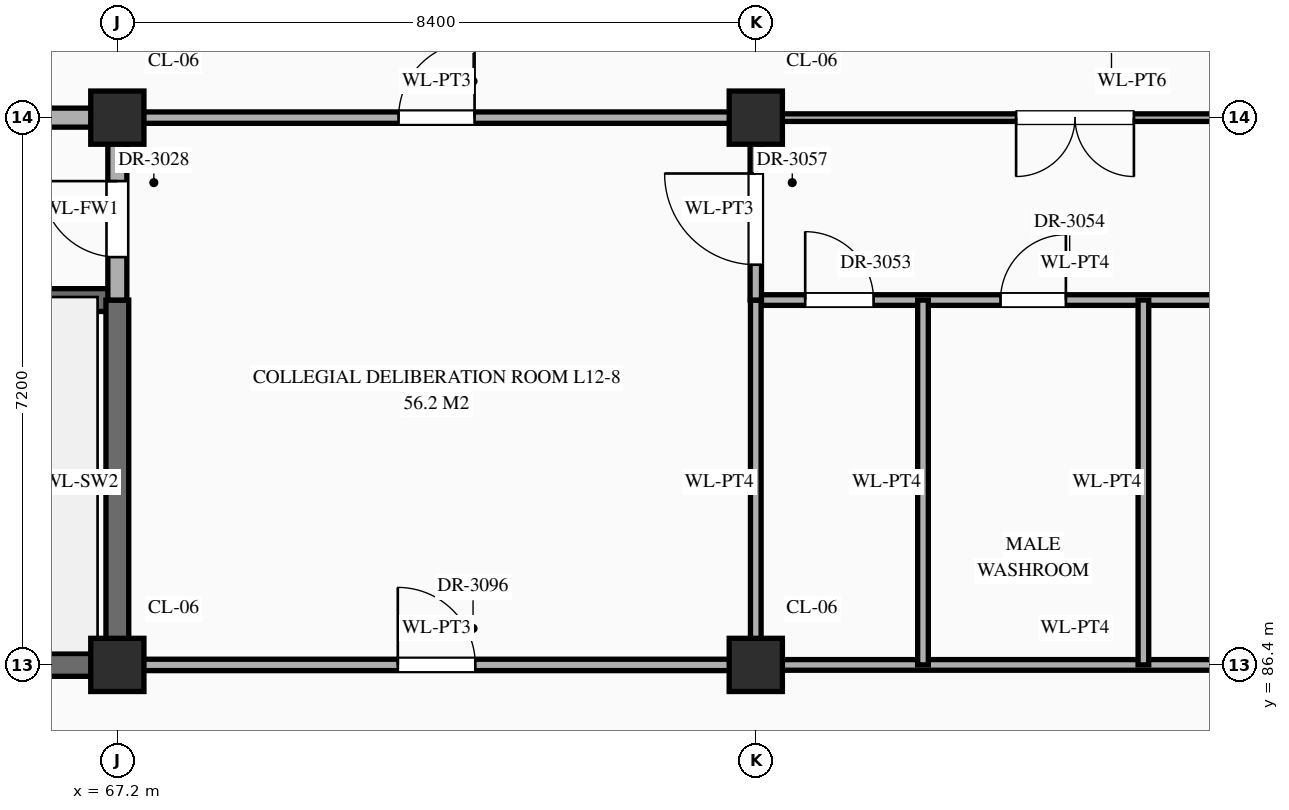
"""IFC4 building model, lengths in metres.
Left out: names, types, materials, properties, quantities, classifications, styles, units other than length and angle.
Written with IfcOpenShell. Run it as: python <this file> out.ifc"""

import sys

from ifc_helpers import new_model, si_unit, direction, frame, frame_2d, origin, origin_2d, place, context, subcontext, project, spatial, rectangle, extrude, element, fill, save


model = new_model("IFC4")
c1 = context("Model", 3, precision=1e-05, world=origin(), true_north=direction((0.0, 1.0)))
c2 = subcontext(c1, "Body", "Model", "MODEL_VIEW")
j1 = project(units=[si_unit("LENGTHUNIT", "METRE"), si_unit("PLANEANGLEUNIT", "RADIAN")], contexts=[c1])
p1 = place(None, origin())
s1 = spatial("IfcSite", under=j1, at=p1, CompositionType="ELEMENT")
p2 = place(p1, origin())
s2 = spatial("IfcBuilding", under=s1, at=p2, CompositionType="ELEMENT")
p3 = place(p2, frame((0.0, 0.0, 51.9)))
s3 = spatial("IfcBuildingStorey", under=s2, at=p3, CompositionType="ELEMENT", Elevation=51.9)
for number, where, z_axis, x_axis in (
    (1, (67.2, 86.4, 0.0), (0.0, 0.0, 1.0), (1.0, 0.0, 0.0)),
    (2, (67.2, 93.6, 0.0), (0.0, 0.0, 1.0), (1.0, 0.0, 0.0)),
    (3, (75.6, 86.4, 0.0), (0.0, 0.0, 1.0), (1.0, 0.0, 0.0)),
    (4, (75.6, 93.6, 0.0), (0.0, 0.0, 1.0), (1.0, 0.0, 0.0)),
):
    element("IfcColumn", number, at=place(p3, frame(where, z_axis=z_axis, x_axis=x_axis)), inside=s3, PredefinedType="COLUMN", context=c2, shape_type="SweptSolid", body=[
        extrude(rectangle(XDim=0.7, YDim=0.7, at=origin_2d()), origin(), (0.0, 0.0, 1.0), 4.2),
    ])
p4 = place(p3, frame((58.8, 86.4, 0.0), z_axis=(0.0, 0.0, 1.0), x_axis=(1.0, 0.0, 0.0)))
e5 = element("IfcWall", 5, at=p4, inside=s3, PredefinedType="SHEAR", context=c2, shape_type="SweptSolid", body=[
    extrude(rectangle(XDim=8.4, YDim=0.3, at=frame_2d((4.2, 0.0))), origin(), (0.0, 0.0, 1.0), 3.96),
])
p5 = place(p3, frame((67.2, 86.4, 0.0), z_axis=(0.0, 0.0, 1.0), x_axis=(1.0, 0.0, 0.0)))
e6 = element("IfcWall", 6, at=p5, inside=s3, PredefinedType="STANDARD", context=c2, shape_type="SweptSolid", body=[
    extrude(rectangle(XDim=8.4, YDim=0.15, at=frame_2d((4.2, 0.0))), origin(), (0.0, 0.0, 1.0), 3.11),
])
p6 = place(p5, frame((3.69, 0.0, 0.0)))
e7 = element("IfcOpeningElement", 7, at=p6, cuts=e6, PredefinedType="OPENING", context=c2, shape_type="SweptSolid", body=[
    extrude(rectangle(XDim=1.02, YDim=2.4, at=frame_2d((0.51, 1.2))), frame((0.0, 0.087, 0.0), z_axis=(0.0, -1.0, 0.0), x_axis=(1.0, 0.0, 0.0)), (0.0, 0.0, 1.0), 0.174),
])
p7 = place(p3, frame((75.6, 86.4, 0.0), z_axis=(0.0, 0.0, 1.0), x_axis=(1.0, 0.0, 0.0)))
e8 = element("IfcWall", 8, at=p7, inside=s3, PredefinedType="STANDARD", context=c2, shape_type="SweptSolid", body=[
    extrude(rectangle(XDim=8.4, YDim=0.14, at=frame_2d((4.2, 0.0))), origin(), (0.0, 0.0, 1.0), 3.11),
])
p8 = place(p3, frame((58.8, 91.2, 0.0), z_axis=(0.0, 0.0, 1.0), x_axis=(1.0, 0.0, 0.0)))
e9 = element("IfcWall", 9, at=p8, inside=s3, PredefinedType="SHEAR", context=c2, shape_type="SweptSolid", body=[
    extrude(rectangle(XDim=8.4, YDim=0.3, at=frame_2d((4.2, 0.0))), origin(), (0.0, 0.0, 1.0), 3.96),
])
p9 = place(p8, frame((0.65, 0.0, 0.0)))
e10 = element("IfcOpeningElement", 10, at=p9, cuts=e9, PredefinedType="OPENING", context=c2, shape_type="SweptSolid", body=[
    extrude(rectangle(XDim=1.1, YDim=2.2, at=frame_2d((0.55, 1.1))), frame((0.0, 0.162, 0.0), z_axis=(0.0, -1.0, 0.0), x_axis=(1.0, 0.0, 0.0)), (0.0, 0.0, 1.0), 0.324),
])
p10 = place(p3, frame((75.6, 91.2, 0.0), z_axis=(0.0, 0.0, 1.0), x_axis=(1.0, 0.0, 0.0)))
e11 = element("IfcWall", 11, at=p10, inside=s3, PredefinedType="STANDARD", context=c2, shape_type="SweptSolid", body=[
    extrude(rectangle(XDim=8.4, YDim=0.14, at=frame_2d((4.2, 0.0))), origin(), (0.0, 0.0, 1.0), 3.96),
])
p11 = place(p10, frame((0.65, 0.0, 0.0)))
e12 = element("IfcOpeningElement", 12, at=p11, cuts=e11, PredefinedType="OPENING", context=c2, shape_type="SweptSolid", body=[
    extrude(rectangle(XDim=0.9, YDim=2.15, at=frame_2d((0.45, 1.075))), frame((0.0, 0.082, 0.0), z_axis=(0.0, -1.0, 0.0), x_axis=(1.0, 0.0, 0.0)), (0.0, 0.0, 1.0), 0.164),
])
p12 = place(p10, frame((3.22, 0.0, 0.0)))
e13 = element("IfcOpeningElement", 13, at=p12, cuts=e11, PredefinedType="OPENING", context=c2, shape_type="SweptSolid", body=[
    extrude(rectangle(XDim=0.86, YDim=2.1, at=frame_2d((0.43, 1.05))), frame((0.0, 0.082, 0.0), z_axis=(0.0, -1.0, 0.0), x_axis=(1.0, 0.0, 0.0)), (0.0, 0.0, 1.0), 0.164),
])
p13 = place(p10, frame((6.32, 0.0, 0.0)))
e14 = element("IfcOpeningElement", 14, at=p13, cuts=e11, PredefinedType="OPENING", context=c2, shape_type="SweptSolid", body=[
    extrude(rectangle(XDim=0.86, YDim=2.1, at=frame_2d((0.43, 1.05))), frame((0.0, 0.082, 0.0), z_axis=(0.0, -1.0, 0.0), x_axis=(1.0, 0.0, 0.0)), (0.0, 0.0, 1.0), 0.164),
])
p14 = place(p3, frame((58.8, 93.6, 0.0), z_axis=(0.0, 0.0, 1.0), x_axis=(1.0, 0.0, 0.0)))
e15 = element("IfcWall", 15, at=p14, inside=s3, PredefinedType="STANDARD", context=c2, shape_type="SweptSolid", body=[
    extrude(rectangle(XDim=8.4, YDim=0.25, at=frame_2d((4.2, 0.0))), origin(), (0.0, 0.0, 1.0), 3.11),
])
p15 = place(p14, frame((3.45, 0.0, 0.0)))
e16 = element("IfcOpeningElement", 16, at=p15, cuts=e15, PredefinedType="OPENING", context=c2, shape_type="SweptSolid", body=[
    extrude(rectangle(XDim=1.5, YDim=2.25, at=frame_2d((0.75, 1.125))), frame((0.0, 0.137, 0.0), z_axis=(0.0, -1.0, 0.0), x_axis=(1.0, 0.0, 0.0)), (0.0, 0.0, 1.0), 0.274),
])
p16 = place(p3, frame((67.2, 93.6, 0.0), z_axis=(0.0, 0.0, 1.0), x_axis=(1.0, 0.0, 0.0)))
e17 = element("IfcWall", 17, at=p16, inside=s3, PredefinedType="STANDARD", context=c2, shape_type="SweptSolid", body=[
    extrude(rectangle(XDim=8.4, YDim=0.15, at=frame_2d((4.2, 0.0))), origin(), (0.0, 0.0, 1.0), 3.11),
])
p17 = place(p16, frame((3.7, 0.0, 0.0)))
e18 = element("IfcOpeningElement", 18, at=p17, cuts=e17, PredefinedType="OPENING", context=c2, shape_type="SweptSolid", body=[
    extrude(rectangle(XDim=1.0, YDim=2.25, at=frame_2d((0.5, 1.125))), frame((0.0, 0.087, 0.0), z_axis=(0.0, -1.0, 0.0), x_axis=(1.0, 0.0, 0.0)), (0.0, 0.0, 1.0), 0.174),
])
p18 = place(p3, frame((75.6, 93.6, 0.0), z_axis=(0.0, 0.0, 1.0), x_axis=(1.0, 0.0, 0.0)))
e19 = element("IfcWall", 19, at=p18, inside=s3, PredefinedType="STANDARD", context=c2, shape_type="SweptSolid", body=[
    extrude(rectangle(XDim=14.0, YDim=0.1, at=frame_2d((7.0, 0.0))), origin(), (0.0, 0.0, 1.0), 3.11),
])
p19 = place(p18, frame((3.425, 0.0, 0.0)))
e20 = element("IfcOpeningElement", 20, at=p19, cuts=e19, PredefinedType="OPENING", context=c2, shape_type="SweptSolid", body=[
    extrude(rectangle(XDim=1.55, YDim=2.35, at=frame_2d((0.775, 1.175))), frame((0.0, 0.062, 0.0), z_axis=(0.0, -1.0, 0.0), x_axis=(1.0, 0.0, 0.0)), (0.0, 0.0, 1.0), 0.124),
])
p20 = place(p18, frame((9.445, 0.0, 0.0)))
e21 = element("IfcOpeningElement", 21, at=p20, cuts=e19, PredefinedType="OPENING", context=c2, shape_type="SweptSolid", body=[
    extrude(rectangle(XDim=0.98, YDim=2.35, at=frame_2d((0.49, 1.175))), frame((0.0, 0.062, 0.0), z_axis=(0.0, -1.0, 0.0), x_axis=(1.0, 0.0, 0.0)), (0.0, 0.0, 1.0), 0.124),
])
p21 = place(p18, frame((12.09, 0.0, 0.0)))
e22 = element("IfcOpeningElement", 22, at=p21, cuts=e19, PredefinedType="OPENING", context=c2, shape_type="SweptSolid", body=[
    extrude(rectangle(XDim=1.02, YDim=2.4, at=frame_2d((0.51, 1.2))), frame((0.0, 0.062, 0.0), z_axis=(0.0, -1.0, 0.0), x_axis=(1.0, 0.0, 0.0)), (0.0, 0.0, 1.0), 0.124),
])
p22 = place(p3, frame((67.2, 86.4, 0.0), z_axis=(0.0, 0.0, 1.0), x_axis=(0.0, 1.0, 0.0)))
e23 = element("IfcWall", 23, at=p22, inside=s3, PredefinedType="SHEAR", context=c2, shape_type="SweptSolid", body=[
    extrude(rectangle(XDim=4.8, YDim=0.3, at=frame_2d((2.4, 0.0))), origin(), (0.0, 0.0, 1.0), 3.96),
])
p23 = place(p3, frame((67.2, 91.2, 0.0), z_axis=(0.0, 0.0, 1.0), x_axis=(0.0, 1.0, 0.0)))
e24 = element("IfcWall", 24, at=p23, inside=s3, PredefinedType="STANDARD", context=c2, shape_type="SweptSolid", body=[
    extrude(rectangle(XDim=2.4, YDim=0.25, at=frame_2d((1.2, 0.0))), origin(), (0.0, 0.0, 1.0), 3.21),
])
p24 = place(p23, frame((0.565, 0.0, 0.0)))
e25 = element("IfcOpeningElement", 25, at=p24, cuts=e24, PredefinedType="OPENING", context=c2, shape_type="SweptSolid", body=[
    extrude(rectangle(XDim=1.0, YDim=2.2, at=frame_2d((0.5, 1.1))), frame((0.0, 0.137, 0.0), z_axis=(0.0, -1.0, 0.0), x_axis=(1.0, 0.0, 0.0)), (0.0, 0.0, 1.0), 0.274),
])
p25 = place(p3, frame((75.6, 86.4, 0.0), z_axis=(0.0, 0.0, 1.0), x_axis=(0.0, 1.0, 0.0)))
e26 = element("IfcWall", 26, at=p25, inside=s3, PredefinedType="STANDARD", context=c2, shape_type="SweptSolid", body=[
    extrude(rectangle(XDim=4.8, YDim=0.14, at=frame_2d((2.4, 0.0))), origin(), (0.0, 0.0, 1.0), 3.21),
])
p26 = place(p3, frame((75.6, 91.2, 0.0), z_axis=(0.0, 0.0, 1.0), x_axis=(0.0, 1.0, 0.0)))
e27 = element("IfcWall", 27, at=p26, inside=s3, PredefinedType="STANDARD", context=c2, shape_type="SweptSolid", body=[
    extrude(rectangle(XDim=2.4, YDim=0.15, at=frame_2d((1.2, 0.0))), origin(), (0.0, 0.0, 1.0), 3.21),
])
p27 = place(p26, frame((0.465, 0.0, 0.0)))
e28 = element("IfcOpeningElement", 28, at=p27, cuts=e27, PredefinedType="OPENING", context=c2, shape_type="SweptSolid", body=[
    extrude(rectangle(XDim=1.2, YDim=2.35, at=frame_2d((0.6, 1.175))), frame((0.0, 0.087, 0.0), z_axis=(0.0, -1.0, 0.0), x_axis=(1.0, 0.0, 0.0)), (0.0, 0.0, 1.0), 0.174),
])
for number, where, z_axis, x_axis in (
    (29, (77.8, 86.4, 0.0), (0.0, 0.0, 1.0), (0.0, 1.0, 0.0)),
    (30, (80.7, 86.4, 0.0), (0.0, 0.0, 1.0), (0.0, 1.0, 0.0)),
):
    element("IfcWall", number, at=place(p3, frame(where, z_axis=z_axis, x_axis=x_axis)), inside=s3, PredefinedType="STANDARD", context=c2, shape_type="SweptSolid", body=[
        extrude(rectangle(XDim=4.8, YDim=0.14, at=frame_2d((2.4, 0.0))), origin(), (0.0, 0.0, 1.0), 3.96),
    ])
p28 = place(p24, origin())
e31 = element("IfcDoor", 31, at=p28, inside=s3, OperationType="SINGLE_SWING_RIGHT", PredefinedType="DOOR", context=c2, shape_type="SweptSolid", body=[
    extrude(rectangle(XDim=1.0, YDim=2.2, at=frame_2d((0.5, 1.1))), frame((0.0, 0.025, 0.0), z_axis=(0.0, -1.0, 0.0), x_axis=(1.0, 0.0, 0.0)), (0.0, 0.0, 1.0), 0.05),
])
fill(e25, e31)
p29 = place(p11, origin())
e32 = element("IfcDoor", 32, at=p29, inside=s3, OperationType="SINGLE_SWING_LEFT", PredefinedType="DOOR", context=c2, shape_type="SweptSolid", body=[
    extrude(rectangle(XDim=0.9, YDim=2.15, at=frame_2d((0.45, 1.075))), frame((0.0, 0.025, 0.0), z_axis=(0.0, -1.0, 0.0), x_axis=(1.0, 0.0, 0.0)), (0.0, 0.0, 1.0), 0.05),
])
fill(e12, e32)
p30 = place(p12, origin())
e33 = element("IfcDoor", 33, at=p30, inside=s3, OperationType="SINGLE_SWING_RIGHT", PredefinedType="DOOR", context=c2, shape_type="SweptSolid", body=[
    extrude(rectangle(XDim=0.86, YDim=2.1, at=frame_2d((0.43, 1.05))), frame((0.0, 0.025, 0.0), z_axis=(0.0, -1.0, 0.0), x_axis=(1.0, 0.0, 0.0)), (0.0, 0.0, 1.0), 0.05),
])
fill(e13, e33)
p31 = place(p19, frame((1.55, 0.0, 0.0), z_axis=(0.0, 0.0, 1.0), x_axis=(-1.0, 0.0, 0.0)))
e34 = element("IfcDoor", 34, at=p31, inside=s3, OperationType="DOUBLE_DOOR_SINGLE_SWING", PredefinedType="DOOR", context=c2, shape_type="SweptSolid", body=[
    extrude(rectangle(XDim=1.55, YDim=2.35, at=frame_2d((0.775, 1.175))), frame((0.0, 0.025, 0.0), z_axis=(0.0, -1.0, 0.0), x_axis=(1.0, 0.0, 0.0)), (0.0, 0.0, 1.0), 0.05),
])
fill(e20, e34)
p32 = place(p27, origin())
e35 = element("IfcDoor", 35, at=p32, inside=s3, OperationType="SINGLE_SWING_RIGHT", PredefinedType="DOOR", context=c2, shape_type="SweptSolid", body=[
    extrude(rectangle(XDim=1.2, YDim=2.35, at=frame_2d((0.6, 1.175))), frame((0.0, 0.025, 0.0), z_axis=(0.0, -1.0, 0.0), x_axis=(1.0, 0.0, 0.0)), (0.0, 0.0, 1.0), 0.05),
])
fill(e28, e35)
p33 = place(p17, origin())
e36 = element("IfcDoor", 36, at=p33, inside=s3, OperationType="SINGLE_SWING_RIGHT", PredefinedType="DOOR", context=c2, shape_type="SweptSolid", body=[
    extrude(rectangle(XDim=1.0, YDim=2.25, at=frame_2d((0.5, 1.125))), frame((0.0, 0.025, 0.0), z_axis=(0.0, -1.0, 0.0), x_axis=(1.0, 0.0, 0.0)), (0.0, 0.0, 1.0), 0.05),
])
fill(e18, e36)
p34 = place(p6, origin())
e37 = element("IfcDoor", 37, at=p34, inside=s3, OperationType="SINGLE_SWING_LEFT", PredefinedType="DOOR", context=c2, shape_type="SweptSolid", body=[
    extrude(rectangle(XDim=1.02, YDim=2.4, at=frame_2d((0.51, 1.2))), frame((0.0, 0.025, 0.0), z_axis=(0.0, -1.0, 0.0), x_axis=(1.0, 0.0, 0.0)), (0.0, 0.0, 1.0), 0.05),
])
fill(e7, e37)
save(model, sys.argv[1])
